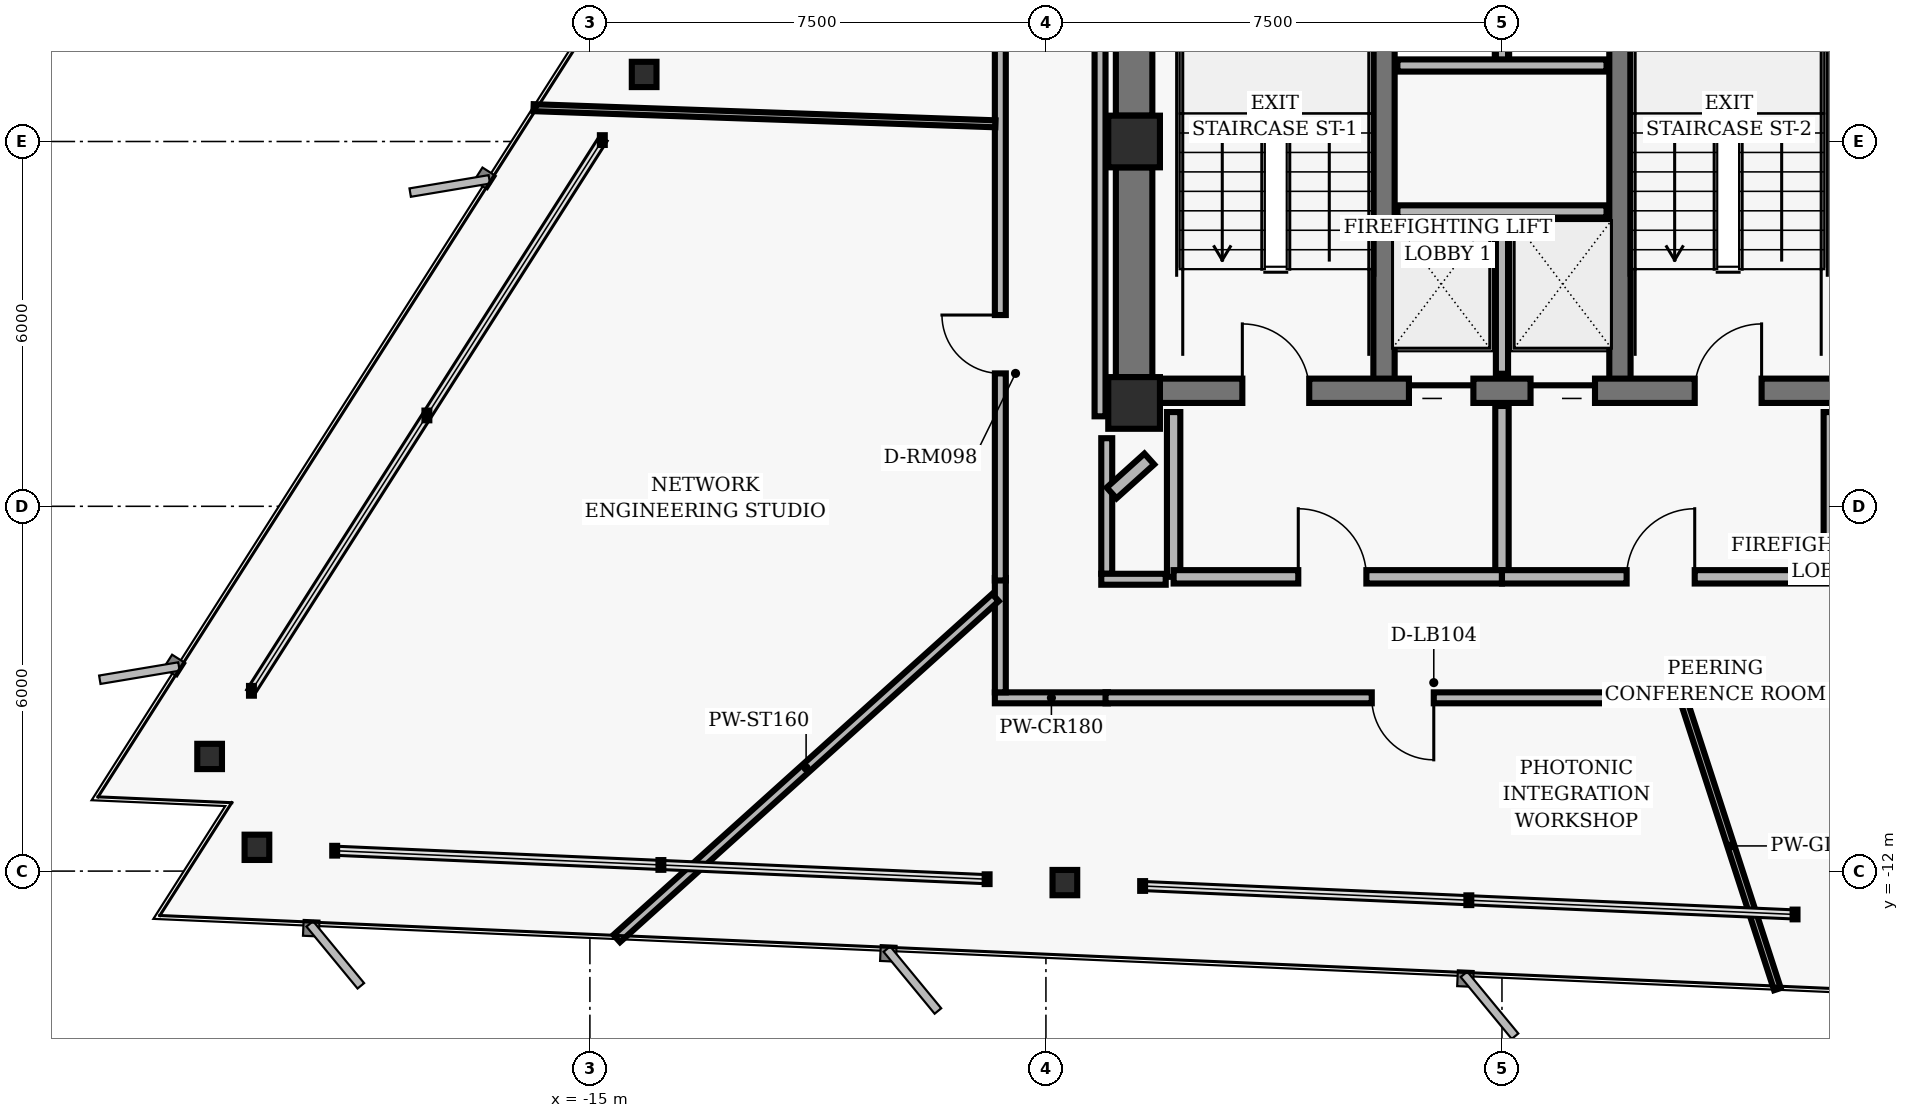
"""IFC4 building model, lengths in metres.
Left out: names, types, materials, properties, quantities, classifications, styles, units other than length and angle.
Written with IfcOpenShell. Run it as: python <this file> out.ifc"""

import sys

from ifc_helpers import new_model, si_unit, direction, frame, frame_2d, origin, origin_2d, place, context, subcontext, project, spatial, rectangle, hollow_rectangle, i_section, extrude, element, fill, save


model = new_model("IFC4")
c1 = context("Model", 3, precision=1e-05, world=origin(), true_north=direction((0.0, 1.0)))
c2 = subcontext(c1, "Body", "Model", "MODEL_VIEW")
j1 = project(units=[si_unit("LENGTHUNIT", "METRE"), si_unit("PLANEANGLEUNIT", "RADIAN")], contexts=[c1])
p1 = place(None, origin())
s1 = spatial("IfcSite", under=j1, at=p1, CompositionType="ELEMENT")
p2 = place(p1, origin())
s2 = spatial("IfcBuilding", under=s1, at=p2, CompositionType="ELEMENT")
p3 = place(p2, frame((0.0, 0.0, 135.04)))
s3 = spatial("IfcBuildingStorey", under=s2, at=p3, CompositionType="ELEMENT", Elevation=135.04)
for number, where, z_axis, x_axis in (
    (1, (-6.05, 0.0, 0.0), (0.0, 0.0, 1.0), (1.0, 0.0, 0.0)),
    (2, (-6.05, -4.3, 0.0), (0.0, 0.0, 1.0), (1.0, 0.0, 0.0)),
):
    element("IfcColumn", number, at=place(p3, frame(where, z_axis=z_axis, x_axis=x_axis)), inside=s3, PredefinedType="COLUMN", context=c2, shape_type="SweptSolid", body=[
        extrude(hollow_rectangle(XDim=0.85, YDim=0.85, WallThickness=0.055, InnerFilletRadius=0.02, OuterFilletRadius=0.04, at=origin_2d()), origin(), (0.0, 0.0, 1.0), 3.04),
    ])
p4 = place(p3, frame((-6.05, 0.425, 0.0), z_axis=(0.0, 0.0, 1.0), x_axis=(0.0, 1.0, 0.0)))
e3 = element("IfcWall", 3, at=p4, inside=s3, PredefinedType="SHEAR", context=c2, shape_type="SweptSolid", body=[
    extrude(rectangle(XDim=3.65, YDim=0.6, at=frame_2d((1.825, 0.0))), origin(), (0.0, 0.0, 1.0), 2.788),
])
p5 = place(p3, frame((-6.05, -3.875, 0.0), z_axis=(0.0, 0.0, 1.0), x_axis=(0.0, 1.0, 0.0)))
e4 = element("IfcWall", 4, at=p5, inside=s3, PredefinedType="SHEAR", context=c2, shape_type="SweptSolid", body=[
    extrude(rectangle(XDim=3.45, YDim=0.6, at=frame_2d((1.725, 0.0))), origin(), (0.0, 0.0, 1.0), 2.788),
])
for number, where, z_axis, x_axis in (
    (5, (-1.94, -4.1, 0.0), (0.0, 0.0, 1.0), (0.0, 1.0, 0.0)),
    (6, (1.94, -4.1, 0.0), (0.0, 0.0, 1.0), (0.0, 1.0, 0.0)),
):
    element("IfcWall", number, at=place(p3, frame(where, z_axis=z_axis, x_axis=x_axis)), inside=s3, PredefinedType="SHEAR", context=c2, shape_type="SweptSolid", body=[
        extrude(rectangle(XDim=8.2, YDim=0.35, at=frame_2d((4.1, 0.0))), origin(), (0.0, 0.0, 1.0), 2.788),
    ])
p6 = place(p3, frame((-5.625, -4.1, 0.0), z_axis=(0.0, 0.0, 1.0), x_axis=(1.0, 0.0, 0.0)))
e7 = element("IfcWall", 7, at=p6, inside=s3, PredefinedType="SHEAR", context=c2, shape_type="SweptSolid", body=[
    extrude(rectangle(XDim=11.25, YDim=0.4, at=frame_2d((5.625, 0.0))), origin(), (0.0, 0.0, 1.0), 2.788),
])
p7 = place(p6, frame((1.355, 0.0, 0.0)))
e8 = element("IfcOpeningElement", 8, at=p7, cuts=e7, PredefinedType="OPENING", context=c2, shape_type="SweptSolid", body=[
    extrude(rectangle(XDim=1.1, YDim=2.04, at=frame_2d((0.55, 1.02))), frame((0.0, 0.21, 0.0), z_axis=(0.0, -1.0, 0.0), x_axis=(1.0, 0.0, 0.0)), (0.0, 0.0, 1.0), 0.42),
])
p8 = place(p6, frame((8.795, 0.0, 0.0)))
e9 = element("IfcOpeningElement", 9, at=p8, cuts=e7, PredefinedType="OPENING", context=c2, shape_type="SweptSolid", body=[
    extrude(rectangle(XDim=1.1, YDim=2.04, at=frame_2d((0.55, 1.02))), frame((0.0, 0.21, 0.0), z_axis=(0.0, -1.0, 0.0), x_axis=(1.0, 0.0, 0.0)), (0.0, 0.0, 1.0), 0.42),
])
p9 = place(p6, frame((4.095, 0.0, 0.0)))
e10 = element("IfcOpeningElement", 10, at=p9, cuts=e7, PredefinedType="OPENING", context=c2, shape_type="SweptSolid", body=[
    extrude(rectangle(XDim=1.06, YDim=2.04, at=frame_2d((0.53, 1.02))), frame((0.0, 0.21, 0.0), z_axis=(0.0, -1.0, 0.0), x_axis=(1.0, 0.0, 0.0)), (0.0, 0.0, 1.0), 0.42),
])
p10 = place(p6, frame((6.095, 0.0, 0.0)))
e11 = element("IfcOpeningElement", 11, at=p10, cuts=e7, PredefinedType="OPENING", context=c2, shape_type="SweptSolid", body=[
    extrude(rectangle(XDim=1.06, YDim=2.04, at=frame_2d((0.53, 1.02))), frame((0.0, 0.21, 0.0), z_axis=(0.0, -1.0, 0.0), x_axis=(1.0, 0.0, 0.0)), (0.0, 0.0, 1.0), 0.42),
])
for number, where, z_axis, x_axis in (
    (12, (-14.108, 1.103, 0.0), (0.0, 0.0, 1.0), (1.0, 0.0, 0.0)),
    (13, (-21.254, -10.114, 0.0), (0.0, 0.0, 1.0), (1.0, 0.0, 0.0)),
    (14, (-20.476, -11.609, 0.0), (0.0, 0.0, 1.0), (1.0, 0.0, 0.0)),
    (15, (-7.188, -12.189, 0.0), (0.0, 0.0, 1.0), (1.0, 0.0, 0.0)),
):
    element("IfcColumn", number, at=place(p3, frame(where, z_axis=z_axis, x_axis=x_axis)), inside=s3, PredefinedType="COLUMN", context=c2, shape_type="SweptSolid", body=[
        extrude(i_section(OverallWidth=0.406, OverallDepth=0.416, WebThickness=0.03, FlangeThickness=0.048, FilletRadius=0.02, at=origin_2d()), origin(), (0.0, 0.0, 1.0), 3.04),
    ])
p11 = place(p3, frame((0.0, -3.82, 0.0), z_axis=(0.0, 0.0, 1.0), x_axis=(0.0, 1.0, 0.0)))
e16 = element("IfcWall", 16, at=p11, inside=s3, PredefinedType="PARTITIONING", context=c2, shape_type="SweptSolid", body=[
    extrude(rectangle(XDim=2.67, YDim=0.2, at=frame_2d((1.335, 0.0))), origin(), (0.0, 0.0, 1.0), 2.763),
])
p12 = place(p3, frame((-1.72, -1.15, 0.0), z_axis=(0.0, 0.0, 1.0), x_axis=(1.0, 0.0, 0.0)))
e17 = element("IfcWall", 17, at=p12, inside=s3, PredefinedType="PARTITIONING", context=c2, shape_type="SweptSolid", body=[
    extrude(rectangle(XDim=3.44, YDim=0.2, at=frame_2d((1.72, 0.0))), origin(), (0.0, 0.0, 1.0), 2.763),
])
for number, where, z_axis, x_axis in (
    (18, (-5.4, -7.16, 0.0), (0.0, 0.0, 1.0), (0.0, 1.0, 0.0)),
    (19, (5.4, -7.16, 0.0), (0.0, 0.0, 1.0), (0.0, 1.0, 0.0)),
):
    element("IfcWall", number, at=place(p3, frame(where, z_axis=z_axis, x_axis=x_axis)), inside=s3, PredefinedType="PARTITIONING", context=c2, shape_type="SweptSolid", body=[
        extrude(rectangle(XDim=2.71, YDim=0.22, at=frame_2d((1.355, 0.0))), origin(), (0.0, 0.0, 1.0), 2.763),
    ])
p13 = place(p3, frame((0.0, -7.16, 0.0), z_axis=(0.0, 0.0, 1.0), x_axis=(0.0, 1.0, 0.0)))
e20 = element("IfcWall", 20, at=p13, inside=s3, PredefinedType="PARTITIONING", context=c2, shape_type="SweptSolid", body=[
    extrude(rectangle(XDim=2.81, YDim=0.22, at=frame_2d((1.405, 0.0))), origin(), (0.0, 0.0, 1.0), 2.763),
])
p14 = place(p3, frame((-5.4, -7.16, 0.0), z_axis=(0.0, 0.0, 1.0), x_axis=(1.0, 0.0, 0.0)))
e21 = element("IfcWall", 21, at=p14, inside=s3, PredefinedType="PARTITIONING", context=c2, shape_type="SweptSolid", body=[
    extrude(rectangle(XDim=5.4, YDim=0.22, at=frame_2d((2.7, 0.0))), origin(), (0.0, 0.0, 1.0), 2.33),
])
p15 = place(p14, frame((2.05, 0.0, 0.0)))
e22 = element("IfcOpeningElement", 22, at=p15, cuts=e21, PredefinedType="OPENING", context=c2, shape_type="SweptSolid", body=[
    extrude(rectangle(XDim=1.12, YDim=2.02, at=frame_2d((0.56, 1.01))), frame((0.0, 0.12, 0.0), z_axis=(0.0, -1.0, 0.0), x_axis=(1.0, 0.0, 0.0)), (0.0, 0.0, 1.0), 0.24),
])
p16 = place(p3, frame((0.0, -7.16, 0.0), z_axis=(0.0, 0.0, 1.0), x_axis=(1.0, 0.0, 0.0)))
e23 = element("IfcWall", 23, at=p16, inside=s3, PredefinedType="PARTITIONING", context=c2, shape_type="SweptSolid", body=[
    extrude(rectangle(XDim=5.4, YDim=0.22, at=frame_2d((2.7, 0.0))), origin(), (0.0, 0.0, 1.0), 2.33),
])
p17 = place(p16, frame((2.05, 0.0, 0.0)))
e24 = element("IfcOpeningElement", 24, at=p17, cuts=e23, PredefinedType="OPENING", context=c2, shape_type="SweptSolid", body=[
    extrude(rectangle(XDim=1.12, YDim=2.02, at=frame_2d((0.56, 1.01))), frame((0.0, 0.12, 0.0), z_axis=(0.0, -1.0, 0.0), x_axis=(1.0, 0.0, 0.0)), (0.0, 0.0, 1.0), 0.24),
])
p18 = place(p3, frame((0.0, 1.25, 0.0), z_axis=(0.0, 0.0, 1.0), x_axis=(0.0, 1.0, 0.0)))
e25 = element("IfcWall", 25, at=p18, inside=s3, PredefinedType="PARTITIONING", context=c2, shape_type="SweptSolid", body=[
    extrude(rectangle(XDim=2.77, YDim=0.2, at=frame_2d((1.385, 0.0))), origin(), (0.0, 0.0, 1.0), 2.763),
])
p19 = place(p3, frame((-1.72, 1.25, 0.0), z_axis=(0.0, 0.0, 1.0), x_axis=(1.0, 0.0, 0.0)))
e26 = element("IfcWall", 26, at=p19, inside=s3, PredefinedType="PARTITIONING", context=c2, shape_type="SweptSolid", body=[
    extrude(rectangle(XDim=3.44, YDim=0.2, at=frame_2d((1.72, 0.0))), origin(), (0.0, 0.0, 1.0), 2.763),
])
p20 = place(p3, frame((-6.48, -9.15, 0.0), z_axis=(0.0, 0.0, 1.0), x_axis=(-1.0, 0.0, 0.0)))
e27 = element("IfcWall", 27, at=p20, inside=s3, PredefinedType="PARTITIONING", context=c2, shape_type="SweptSolid", body=[
    extrude(rectangle(XDim=1.86, YDim=0.18, at=frame_2d((0.93, 0.0))), origin(), (0.0, 0.0, 1.0), 2.33),
])
p21 = place(p3, frame((-8.25, -9.06, 0.0), z_axis=(0.0, 0.0, 1.0), x_axis=(0.0, 1.0, 0.0)))
e28 = element("IfcWall", 28, at=p21, inside=s3, PredefinedType="PARTITIONING", context=c2, shape_type="SweptSolid", body=[
    extrude(rectangle(XDim=1.88, YDim=0.18, at=frame_2d((0.94, 0.0))), origin(), (0.0, 0.0, 1.0), 2.763),
])
p22 = place(p3, frame((-8.25, -7.22, 0.0), z_axis=(0.0, 0.0, 1.0), x_axis=(0.0, 1.0, 0.0)))
e29 = element("IfcWall", 29, at=p22, inside=s3, PredefinedType="PARTITIONING", context=c2, shape_type="SweptSolid", body=[
    extrude(rectangle(XDim=14.44, YDim=0.18, at=frame_2d((7.22, 0.0))), origin(), (0.0, 0.0, 1.0), 2.763),
])
p23 = place(p22, frame((3.406, 0.0, 0.0)))
e30 = element("IfcOpeningElement", 30, at=p23, cuts=e29, PredefinedType="OPENING", context=c2, shape_type="SweptSolid", body=[
    extrude(rectangle(XDim=0.96, YDim=2.02, at=frame_2d((0.48, 1.01))), frame((0.0, 0.1, 0.0), z_axis=(0.0, -1.0, 0.0), x_axis=(1.0, 0.0, 0.0)), (0.0, 0.0, 1.0), 0.2),
])
p24 = place(p22, frame((10.365, 0.0, 0.0)))
e31 = element("IfcOpeningElement", 31, at=p24, cuts=e29, PredefinedType="OPENING", context=c2, shape_type="SweptSolid", body=[
    extrude(rectangle(XDim=0.96, YDim=2.02, at=frame_2d((0.48, 1.01))), frame((0.0, 0.1, 0.0), z_axis=(0.0, -1.0, 0.0), x_axis=(1.0, 0.0, 0.0)), (0.0, 0.0, 1.0), 0.2),
])
p25 = place(p3, frame((10.98, -9.15, 0.0), z_axis=(0.0, 0.0, 1.0), x_axis=(-1.0, 0.0, 0.0)))
e32 = element("IfcWall", 32, at=p25, inside=s3, PredefinedType="PARTITIONING", context=c2, shape_type="SweptSolid", body=[
    extrude(rectangle(XDim=17.5, YDim=0.18, at=frame_2d((8.75, 0.0))), origin(), (0.0, 0.0, 1.0), 2.33),
])
p26 = place(p25, frame((12.102, 0.0, 0.0)))
e33 = element("IfcOpeningElement", 33, at=p26, cuts=e32, PredefinedType="OPENING", context=c2, shape_type="SweptSolid", body=[
    extrude(rectangle(XDim=1.02, YDim=2.02, at=frame_2d((0.51, 1.01))), frame((0.0, 0.1, 0.0), z_axis=(0.0, -1.0, 0.0), x_axis=(1.0, 0.0, 0.0)), (0.0, 0.0, 1.0), 0.2),
])
p27 = place(p25, frame((3.639, 0.0, 0.0)))
e34 = element("IfcOpeningElement", 34, at=p27, cuts=e32, PredefinedType="OPENING", context=c2, shape_type="SweptSolid", body=[
    extrude(rectangle(XDim=0.96, YDim=2.02, at=frame_2d((0.48, 1.01))), frame((0.0, 0.1, 0.0), z_axis=(0.0, -1.0, 0.0), x_axis=(1.0, 0.0, 0.0)), (0.0, 0.0, 1.0), 0.2),
])
p28 = place(p3, frame((-6.61, 4.94, 0.0), z_axis=(0.0, 0.0, 1.0), x_axis=(0.0, -1.0, 0.0)))
e35 = element("IfcWall", 35, at=p28, inside=s3, PredefinedType="PARTITIONING", context=c2, shape_type="SweptSolid", body=[
    extrude(rectangle(XDim=9.46, YDim=0.18, at=frame_2d((4.73, 0.0))), origin(), (0.0, 0.0, 1.0), 2.763),
])
p29 = place(p3, frame((-6.5, -4.88, 0.0), z_axis=(0.0, 0.0, 1.0), x_axis=(0.0, -1.0, 0.0)))
e36 = element("IfcWall", 36, at=p29, inside=s3, PredefinedType="PARTITIONING", context=c2, shape_type="SweptSolid", body=[
    extrude(rectangle(XDim=2.23, YDim=0.18, at=frame_2d((1.115, 0.0))), origin(), (0.0, 0.0, 1.0), 2.132),
])
p30 = place(p3, frame((-6.59, -7.2, 0.0), z_axis=(0.0, 0.0, 1.0), x_axis=(1.0, 0.0, 0.0)))
e37 = element("IfcWall", 37, at=p30, inside=s3, PredefinedType="PARTITIONING", context=c2, shape_type="SweptSolid", body=[
    extrude(rectangle(XDim=1.06, YDim=0.18, at=frame_2d((0.53, 0.0))), origin(), (0.0, 0.0, 1.0), 2.33),
])
p31 = place(p3, frame((-5.8, -5.222, 0.0), z_axis=(0.0, 0.0, 1.0), x_axis=(-0.743163145085, -0.669110259813, 0.0)))
e38 = element("IfcWall", 38, at=p31, inside=s3, PredefinedType="PARTITIONING", context=c2, shape_type="SweptSolid", body=[
    extrude(rectangle(XDim=0.834, YDim=0.24, at=frame_2d((0.417, 0.0))), origin(), (0.0, 0.0, 1.0), 2.763),
])
p32 = place(p3, frame((-8.33, -7.5, 0.0), z_axis=(0.0, 0.0, 1.0), x_axis=(-0.743147832275, -0.669127266957, 0.0)))
e39 = element("IfcWall", 39, at=p32, inside=s3, PredefinedType="PARTITIONING", context=c2, shape_type="SweptSolid", body=[
    extrude(rectangle(XDim=8.381, YDim=0.16, at=frame_2d((4.19, 0.0))), origin(), (0.0, 0.0, 1.0), 2.763),
])
p33 = place(p3, frame((2.999, -9.23, 0.0), z_axis=(0.0, 0.0, 1.0), x_axis=(0.309019216851, -0.951055794166, 0.0)))
e40 = element("IfcWall", 40, at=p33, inside=s3, PredefinedType="MOVABLE", context=c2, shape_type="SweptSolid", body=[
    extrude(rectangle(XDim=4.954, YDim=0.115, at=frame_2d((2.477, 0.0))), origin(), (0.0, 0.0, 1.0), 2.763),
])
p34 = place(p3, frame((-8.33, 0.291, 0.0), z_axis=(0.0, 0.0, 1.0), x_axis=(-0.999391414835, 0.034882659784, 0.0)))
e41 = element("IfcWall", 41, at=p34, inside=s3, PredefinedType="MOVABLE", context=c2, shape_type="SweptSolid", body=[
    extrude(rectangle(XDim=7.601, YDim=0.115, at=frame_2d((3.8, 0.0))), origin(), (0.0, 0.0, 1.0), 2.132),
])
p35 = place(p7, origin())
e42 = element("IfcDoor", 42, at=p35, inside=s3, OperationType="SINGLE_SWING_LEFT", PredefinedType="DOOR", context=c2, shape_type="SweptSolid", body=[
    extrude(rectangle(XDim=1.1, YDim=2.04, at=frame_2d((0.55, 1.02))), frame((0.0, 0.025, 0.0), z_axis=(0.0, -1.0, 0.0), x_axis=(1.0, 0.0, 0.0)), (0.0, 0.0, 1.0), 0.05),
])
fill(e8, e42)
p36 = place(p8, origin())
e43 = element("IfcDoor", 43, at=p36, inside=s3, OperationType="SINGLE_SWING_RIGHT", PredefinedType="DOOR", context=c2, shape_type="SweptSolid", body=[
    extrude(rectangle(XDim=1.1, YDim=2.04, at=frame_2d((0.55, 1.02))), frame((0.0, 0.025, 0.0), z_axis=(0.0, -1.0, 0.0), x_axis=(1.0, 0.0, 0.0)), (0.0, 0.0, 1.0), 0.05),
])
fill(e9, e43)
p37 = place(p9, origin())
e44 = element("IfcDoor", 44, at=p37, inside=s3, OperationType="SLIDING_TO_LEFT", PredefinedType="DOOR", context=c2, shape_type="SweptSolid", body=[
    extrude(rectangle(XDim=1.06, YDim=2.04, at=frame_2d((0.53, 1.02))), frame((0.0, 0.025, 0.0), z_axis=(0.0, -1.0, 0.0), x_axis=(1.0, 0.0, 0.0)), (0.0, 0.0, 1.0), 0.05),
])
fill(e10, e44)
p38 = place(p10, origin())
e45 = element("IfcDoor", 45, at=p38, inside=s3, OperationType="SLIDING_TO_RIGHT", PredefinedType="DOOR", context=c2, shape_type="SweptSolid", body=[
    extrude(rectangle(XDim=1.06, YDim=2.04, at=frame_2d((0.53, 1.02))), frame((0.0, 0.025, 0.0), z_axis=(0.0, -1.0, 0.0), x_axis=(1.0, 0.0, 0.0)), (0.0, 0.0, 1.0), 0.05),
])
fill(e11, e45)
p39 = place(p15, origin())
e46 = element("IfcDoor", 46, at=p39, inside=s3, OperationType="SINGLE_SWING_LEFT", PredefinedType="DOOR", context=c2, shape_type="SweptSolid", body=[
    extrude(rectangle(XDim=1.12, YDim=2.02, at=frame_2d((0.56, 1.01))), frame((0.0, 0.025, 0.0), z_axis=(0.0, -1.0, 0.0), x_axis=(1.0, 0.0, 0.0)), (0.0, 0.0, 1.0), 0.05),
])
fill(e22, e46)
p40 = place(p17, origin())
e47 = element("IfcDoor", 47, at=p40, inside=s3, OperationType="SINGLE_SWING_RIGHT", PredefinedType="DOOR", context=c2, shape_type="SweptSolid", body=[
    extrude(rectangle(XDim=1.12, YDim=2.02, at=frame_2d((0.56, 1.01))), frame((0.0, 0.025, 0.0), z_axis=(0.0, -1.0, 0.0), x_axis=(1.0, 0.0, 0.0)), (0.0, 0.0, 1.0), 0.05),
])
fill(e24, e47)
p41 = place(p23, origin())
e48 = element("IfcDoor", 48, at=p41, inside=s3, OperationType="SINGLE_SWING_RIGHT", PredefinedType="DOOR", context=c2, shape_type="SweptSolid", body=[
    extrude(rectangle(XDim=0.96, YDim=2.02, at=frame_2d((0.48, 1.01))), frame((0.0, 0.025, 0.0), z_axis=(0.0, -1.0, 0.0), x_axis=(1.0, 0.0, 0.0)), (0.0, 0.0, 1.0), 0.05),
])
fill(e30, e48)
p42 = place(p26, origin())
e49 = element("IfcDoor", 49, at=p42, inside=s3, OperationType="SINGLE_SWING_LEFT", PredefinedType="DOOR", context=c2, shape_type="SweptSolid", body=[
    extrude(rectangle(XDim=1.02, YDim=2.02, at=frame_2d((0.51, 1.01))), frame((0.0, 0.025, 0.0), z_axis=(0.0, -1.0, 0.0), x_axis=(1.0, 0.0, 0.0)), (0.0, 0.0, 1.0), 0.05),
])
fill(e33, e49)
save(model, sys.argv[1])
